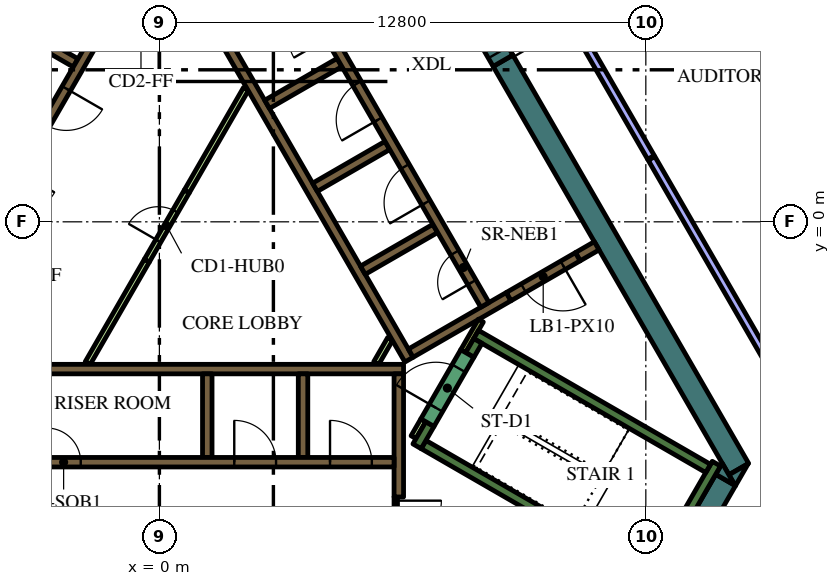
"""IFC4 building model, lengths in metres.
Left out: names, types, materials, properties, quantities, classifications, styles, units other than length and angle.
Written with IfcOpenShell. Run it as: python <this file> out.ifc"""

import sys

from ifc_helpers import new_model, si_unit, direction, frame, frame_2d, origin, place, context, subcontext, project, spatial, polyline, rectangle, outline, extrude, element, fill, save


model = new_model("IFC4")
c1 = context("Model", 3, precision=1e-05, world=origin(), true_north=direction((0.0, 1.0)))
c2 = subcontext(c1, "Body", "Model", "MODEL_VIEW")
j1 = project(units=[si_unit("LENGTHUNIT", "METRE"), si_unit("PLANEANGLEUNIT", "RADIAN")], contexts=[c1])
p1 = place(None, origin())
s1 = spatial("IfcSite", under=j1, at=p1, CompositionType="ELEMENT")
p2 = place(p1, origin())
s2 = spatial("IfcBuilding", under=s1, at=p2, CompositionType="ELEMENT")
p3 = place(p2, frame((0.0, 0.0, 317.4)))
s3 = spatial("IfcBuildingStorey", under=s2, at=p3, CompositionType="ELEMENT", Elevation=317.4)
p4 = place(p3, frame((9.042, 4.239, 0.0), z_axis=(0.0, 0.0, 1.0), x_axis=(0.500005785455, -0.866022063525, 0.0)))
e1 = element("IfcWall", 1, at=p4, inside=s3, PredefinedType="SOLIDWALL", context=c2, shape_type="SweptSolid", body=[
    extrude(rectangle(XDim=12.406, YDim=0.6, at=frame_2d((6.203, 0.0))), origin(), (0.0, 0.0, 1.0), 4.2),
])
p5 = place(p3, origin())
e2 = element("IfcWall", 2, at=p5, inside=s3, PredefinedType="SOLIDWALL", context=c2, shape_type="SweptSolid", body=[
    extrude(outline(polyline([(15.156, -6.95), (14.987, -6.657), (15.493, -6.365), (15.156, -6.95)])), origin(), (0.0, 0.0, 1.0), 4.2),
])
p6 = place(p3, frame((12.987, -10.106, 0.0), z_axis=(0.0, 0.0, 1.0), x_axis=(0.499950938802, 0.866053727428, 0.0)))
e3 = element("IfcWall", 3, at=p6, inside=s3, PredefinedType="SOLIDWALL", context=c2, shape_type="SweptSolid", body=[
    extrude(rectangle(XDim=3.823, YDim=0.6, at=frame_2d((1.912, 0.0))), origin(), (0.0, 0.0, 1.0), 4.2),
])
e4 = element("IfcWall", 4, at=p5, inside=s3, PredefinedType="SOLIDWALL", context=c2, shape_type="SweptSolid", body=[
    extrude(outline(polyline([(14.809, -6.35), (15.147, -6.936), (14.64, -6.643), (14.809, -6.35)])), origin(), (0.0, 0.0, 1.0), 4.2),
])
p7 = place(p3, frame((12.84, -9.511, 0.0), z_axis=(0.0, 0.0, 1.0), x_axis=(0.500048121057, 0.865997619297, 0.0)))
e5 = element("IfcWall", 5, at=p7, inside=s3, PredefinedType="SOLIDWALL", context=c2, shape_type="SweptSolid", body=[
    extrude(rectangle(XDim=3.634, YDim=0.25, at=frame_2d((1.817, 0.0))), origin(), (0.0, 0.0, 1.0), 4.2),
])
p8 = place(p3, frame((12.84, -9.261, 0.0), z_axis=(0.0, 0.0, 1.0), x_axis=(-0.866013990052, 0.500019768644, 0.0)))
e6 = element("IfcWall", 6, at=p8, inside=s3, PredefinedType="SOLIDWALL", context=c2, shape_type="SweptSolid", body=[
    extrude(rectangle(XDim=6.8, YDim=0.25, at=frame_2d((3.4, 0.0))), origin(), (0.0, 0.0, 1.0), 4.2),
])
p9 = place(p3, frame((6.78, -5.906, 0.0), z_axis=(0.0, 0.0, 1.0), x_axis=(0.500223362819, 0.865896406789, 0.0)))
e7 = element("IfcWall", 7, at=p9, inside=s3, PredefinedType="SOLIDWALL", context=c2, shape_type="SweptSolid", body=[
    extrude(rectangle(XDim=0.675, YDim=0.25, at=frame_2d((0.337, 0.0))), origin(), (0.0, 0.0, 1.0), 4.2),
])
p10 = place(p3, frame((8.334, -2.964, 0.0), z_axis=(0.0, 0.0, 1.0), x_axis=(0.866016039709, -0.500016218704, 0.0)))
e8 = element("IfcWall", 8, at=p10, inside=s3, PredefinedType="SOLIDWALL", context=c2, shape_type="SweptSolid", body=[
    extrude(rectangle(XDim=7.05, YDim=0.25, at=frame_2d((3.525, 0.0))), origin(), (0.0, 0.0, 1.0), 4.2),
])
p11 = place(p3, frame((8.168, -3.503, 0.0), z_axis=(0.0, 0.0, 1.0), x_axis=(0.49972245349, 0.866185586049, 0.0)))
e9 = element("IfcWall", 9, at=p11, inside=s3, PredefinedType="SOLIDWALL", context=c2, shape_type="SweptSolid", body=[
    extrude(rectangle(XDim=0.425, YDim=0.25, at=frame_2d((0.212, 0.0))), origin(), (0.0, 0.0, 1.0), 4.2),
])
p12 = place(p3, frame((-5.545, -3.875, 0.0), z_axis=(0.0, 0.0, 1.0), x_axis=(1.0, 0.0, 0.0)))
e10 = element("IfcWall", 10, at=p12, inside=s3, PredefinedType="SOLIDWALL", context=c2, shape_type="SweptSolid", body=[
    extrude(rectangle(XDim=11.97, YDim=0.25, at=frame_2d((5.985, 0.0))), origin(), (0.0, 0.0, 1.0), 4.2),
])
p13 = place(p3, frame((6.3, -7.24, 0.0), z_axis=(0.0, 0.0, 1.0), x_axis=(0.0, 1.0, 0.0)))
e11 = element("IfcWall", 11, at=p13, inside=s3, PredefinedType="SOLIDWALL", context=c2, shape_type="SweptSolid", body=[
    extrude(rectangle(XDim=3.24, YDim=0.25, at=frame_2d((1.62, 0.0))), origin(), (0.0, 0.0, 1.0), 4.2),
])
for number, where, z_axis, x_axis in (
    (12, (3.78, -4.0, 0.0), (0.0, 0.0, 1.0), (0.0, -1.0, 0.0)),
    (13, (1.26, -4.0, 0.0), (0.0, 0.0, 1.0), (0.0, -1.0, 0.0)),
):
    element("IfcWall", number, at=place(p3, frame(where, z_axis=z_axis, x_axis=x_axis)), inside=s3, PredefinedType="SOLIDWALL", context=c2, shape_type="SweptSolid", body=[
        extrude(rectangle(XDim=2.2, YDim=0.25, at=frame_2d((1.1, 0.0))), origin(), (0.0, 0.0, 1.0), 4.2),
    ])
p14 = place(p3, frame((11.507, -0.631, 0.0), z_axis=(0.0, 0.0, 1.0), x_axis=(-0.866093731455, -0.499881634324, 0.0)))
e14 = element("IfcWall", 14, at=p14, inside=s3, PredefinedType="SOLIDWALL", context=c2, shape_type="SweptSolid", body=[
    extrude(rectangle(XDim=0.575, YDim=0.25, at=frame_2d((0.288, 0.0))), origin(), (0.0, 0.0, 1.0), 4.2),
])
p15 = place(p3, frame((6.568, -3.627, 0.0), z_axis=(0.0, 0.0, 1.0), x_axis=(-0.499999455981, 0.866025717874, 0.0)))
e15 = element("IfcWall", 15, at=p15, inside=s3, PredefinedType="SOLIDWALL", context=c2, shape_type="SweptSolid", body=[
    extrude(rectangle(XDim=11.978, YDim=0.25, at=frame_2d((5.989, 0.0))), origin(), (0.0, 0.0, 1.0), 4.2),
])
for number, where, z_axis, x_axis in (
    (16, (2.834, 3.091, 0.0), (0.0, 0.0, 1.0), (0.866, 0.5, 0.0)),
    (17, (4.094, 0.909, 0.0), (0.0, 0.0, 1.0), (0.866, 0.5, 0.0)),
    (18, (5.354, -1.274, 0.0), (0.0, 0.0, 1.0), (0.866, 0.5, 0.0)),
):
    element("IfcWall", number, at=place(p3, frame(where, z_axis=z_axis, x_axis=x_axis)), inside=s3, PredefinedType="SOLIDWALL", context=c2, shape_type="SweptSolid", body=[
        extrude(rectangle(XDim=2.2, YDim=0.25, at=frame_2d((1.1, 0.0))), origin(), (0.0, 0.0, 1.0), 4.2),
    ])
p16 = place(p3, frame((6.614, -3.456, 0.0), z_axis=(0.0, 0.0, 1.0), x_axis=(0.866032512851, 0.499987686533, 0.0)))
e19 = element("IfcWall", 19, at=p16, inside=s3, PredefinedType="SOLIDWALL", context=c2, shape_type="SweptSolid", body=[
    extrude(rectangle(XDim=2.975, YDim=0.25, at=frame_2d((1.487, 0.0))), origin(), (0.0, 0.0, 1.0), 4.2),
])
p17 = place(p3, frame((-8.06, -1.311, 0.0), z_axis=(0.0, 0.0, 1.0), x_axis=(0.50000273126, 0.866023826885, 0.0)))
e20 = element("IfcWall", 20, at=p17, inside=s3, PredefinedType="SOLIDWALL", context=c2, shape_type="SweptSolid", body=[
    extrude(rectangle(XDim=10.33, YDim=0.25, at=frame_2d((5.165, 0.0))), origin(), (0.0, 0.0, 1.0), 4.2),
])
p18 = place(p3, frame((-2.204, 4.182, 0.0), z_axis=(0.0, 0.0, 1.0), x_axis=(-0.866008176907, 0.50002983664, 0.0)))
e21 = element("IfcWall", 21, at=p18, inside=s3, PredefinedType="SOLIDWALL", context=c2, shape_type="SweptSolid", body=[
    extrude(rectangle(XDim=2.2, YDim=0.25, at=frame_2d((1.1, 0.0))), origin(), (0.0, 0.0, 1.0), 4.2),
])
p19 = place(p3, frame((6.945, -5.222, 0.0), z_axis=(0.0, 0.0, 1.0), x_axis=(-0.499818422106, -0.866130212453, 0.0)))
e22 = element("IfcWall", 22, at=p19, inside=s3, PredefinedType="PARTITIONING", context=c2, shape_type="SweptSolid", body=[
    extrude(rectangle(XDim=0.514, YDim=0.15, at=frame_2d((0.257, 0.0))), origin(), (0.0, 0.0, 1.0), 3.5),
])
p20 = place(p3, frame((8.459, -2.599, 0.0), z_axis=(0.0, 0.0, 1.0), x_axis=(-0.500041054325, -0.866001699761, 0.0)))
e23 = element("IfcWall", 23, at=p20, inside=s3, PredefinedType="PARTITIONING", context=c2, shape_type="SweptSolid", body=[
    extrude(rectangle(XDim=0.929, YDim=0.15, at=frame_2d((0.464, 0.0))), origin(), (0.0, 0.0, 1.0), 4.2),
])
p21 = place(p3, frame((5.705, -3.718, 0.0), z_axis=(0.0, 0.0, 1.0), x_axis=(0.499962090823, 0.866047289552, 0.0)))
e24 = element("IfcWall", 24, at=p21, inside=s3, PredefinedType="PARTITIONING", context=c2, shape_type="SweptSolid", body=[
    extrude(rectangle(XDim=0.735, YDim=0.15, at=frame_2d((0.367, 0.0))), origin(), (0.0, 0.0, 1.0), 3.5),
])
p22 = place(p3, frame((-1.887, -3.718, 0.0), z_axis=(0.0, 0.0, 1.0), x_axis=(0.500043732237, 0.866000153493, 0.0)))
e25 = element("IfcWall", 25, at=p22, inside=s3, PredefinedType="PARTITIONING", context=c2, shape_type="SweptSolid", body=[
    extrude(rectangle(XDim=3.114, YDim=0.15, at=frame_2d((1.557, 0.0))), origin(), (0.0, 0.0, 1.0), 3.5),
])
p23 = place(p3, frame((0.72, 0.797, 0.0), z_axis=(0.0, 0.0, 1.0), x_axis=(0.499984921984, 0.866034108906, 0.0)))
e26 = element("IfcWall", 26, at=p23, inside=s3, PredefinedType="PARTITIONING", context=c2, shape_type="SweptSolid", body=[
    extrude(rectangle(XDim=3.113, YDim=0.15, at=frame_2d((1.557, 0.0))), origin(), (0.0, 0.0, 1.0), 3.5),
])
p24 = place(p3, frame((-6.175, -6.325, 0.0), z_axis=(0.0, 0.0, 1.0), x_axis=(1.0, 0.0, 0.0)))
e27 = element("IfcWall", 27, at=p24, inside=s3, PredefinedType="SOLIDWALL", context=c2, shape_type="SweptSolid", body=[
    extrude(rectangle(XDim=12.35, YDim=0.25, at=frame_2d((6.175, 0.0))), origin(), (0.0, 0.0, 1.0), 4.2),
])
p25 = place(p24, frame((3.205, 0.0, 0.0)))
e28 = element("IfcOpeningElement", 28, at=p25, cuts=e27, PredefinedType="OPENING", context=c2, shape_type="SweptSolid", body=[
    extrude(rectangle(XDim=0.9, YDim=2.1, at=frame_2d((0.45, 1.05))), frame((0.0, 0.135, 0.0), z_axis=(0.0, -1.0, 0.0), x_axis=(1.0, 0.0, 0.0)), (0.0, 0.0, 1.0), 0.27),
])
p26 = place(p24, frame((8.145, 0.0, 0.0)))
e29 = element("IfcOpeningElement", 29, at=p26, cuts=e27, PredefinedType="OPENING", context=c2, shape_type="SweptSolid", body=[
    extrude(rectangle(XDim=1.1, YDim=2.1, at=frame_2d((0.55, 1.05))), frame((0.0, 0.135, 0.0), z_axis=(0.0, -1.0, 0.0), x_axis=(1.0, 0.0, 0.0)), (0.0, 0.0, 1.0), 0.27),
])
p27 = place(p24, frame((10.665, 0.0, 0.0)))
e30 = element("IfcOpeningElement", 30, at=p27, cuts=e27, PredefinedType="OPENING", context=c2, shape_type="SweptSolid", body=[
    extrude(rectangle(XDim=1.1, YDim=2.1, at=frame_2d((0.55, 1.05))), frame((0.0, 0.135, 0.0), z_axis=(0.0, -1.0, 0.0), x_axis=(1.0, 0.0, 0.0)), (0.0, 0.0, 1.0), 0.27),
])
p28 = place(p3, frame((8.565, -2.185, 0.0), z_axis=(0.0, 0.0, 1.0), x_axis=(-0.499997954832, 0.866026584559, 0.0)))
e31 = element("IfcWall", 31, at=p28, inside=s3, PredefinedType="SOLIDWALL", context=c2, shape_type="SweptSolid", body=[
    extrude(rectangle(XDim=12.35, YDim=0.25, at=frame_2d((6.175, 0.0))), origin(), (0.0, 0.0, 1.0), 4.2),
])
p29 = place(p28, frame((0.685, 0.0, 0.0)))
e32 = element("IfcOpeningElement", 32, at=p29, cuts=e31, PredefinedType="OPENING", context=c2, shape_type="SweptSolid", body=[
    extrude(rectangle(XDim=0.9, YDim=2.1, at=frame_2d((0.45, 1.05))), frame((0.0, 0.135, 0.0), z_axis=(0.0, -1.0, 0.0), x_axis=(1.0, 0.0, 0.0)), (0.0, 0.0, 1.0), 0.27),
])
p30 = place(p28, frame((3.105, 0.0, 0.0)))
e33 = element("IfcOpeningElement", 33, at=p30, cuts=e31, PredefinedType="OPENING", context=c2, shape_type="SweptSolid", body=[
    extrude(rectangle(XDim=1.1, YDim=2.1, at=frame_2d((0.55, 1.05))), frame((0.0, 0.135, 0.0), z_axis=(0.0, -1.0, 0.0), x_axis=(1.0, 0.0, 0.0)), (0.0, 0.0, 1.0), 0.27),
])
p31 = place(p28, frame((5.625, 0.0, 0.0)))
e34 = element("IfcOpeningElement", 34, at=p31, cuts=e31, PredefinedType="OPENING", context=c2, shape_type="SweptSolid", body=[
    extrude(rectangle(XDim=1.1, YDim=2.1, at=frame_2d((0.55, 1.05))), frame((0.0, 0.135, 0.0), z_axis=(0.0, -1.0, 0.0), x_axis=(1.0, 0.0, 0.0)), (0.0, 0.0, 1.0), 0.27),
])
p32 = place(p28, frame((8.145, 0.0, 0.0)))
e35 = element("IfcOpeningElement", 35, at=p32, cuts=e31, PredefinedType="OPENING", context=c2, shape_type="SweptSolid", body=[
    extrude(rectangle(XDim=1.1, YDim=2.1, at=frame_2d((0.55, 1.05))), frame((0.0, 0.135, 0.0), z_axis=(0.0, -1.0, 0.0), x_axis=(1.0, 0.0, 0.0)), (0.0, 0.0, 1.0), 0.27),
])
p33 = place(p28, frame((10.665, 0.0, 0.0)))
e36 = element("IfcOpeningElement", 36, at=p33, cuts=e31, PredefinedType="OPENING", context=c2, shape_type="SweptSolid", body=[
    extrude(rectangle(XDim=1.1, YDim=2.1, at=frame_2d((0.55, 1.05))), frame((0.0, 0.135, 0.0), z_axis=(0.0, -1.0, 0.0), x_axis=(1.0, 0.0, 0.0)), (0.0, 0.0, 1.0), 0.27),
])
p34 = place(p3, frame((-0.898, 6.194, 0.0), z_axis=(0.0, 0.0, 1.0), x_axis=(-0.499996202215, -0.866027596426, 0.0)))
e37 = element("IfcWall", 37, at=p34, inside=s3, PredefinedType="SOLIDWALL", context=c2, shape_type="SweptSolid", body=[
    extrude(rectangle(XDim=9.83, YDim=0.25, at=frame_2d((4.915, 0.0))), origin(), (0.0, 0.0, 1.0), 4.2),
])
p35 = place(p34, frame((0.585, 0.0, 0.0)))
e38 = element("IfcOpeningElement", 38, at=p35, cuts=e37, PredefinedType="OPENING", context=c2, shape_type="SweptSolid", body=[
    extrude(rectangle(XDim=1.1, YDim=2.1, at=frame_2d((0.55, 1.05))), frame((0.0, 0.135, 0.0), z_axis=(0.0, -1.0, 0.0), x_axis=(1.0, 0.0, 0.0)), (0.0, 0.0, 1.0), 0.27),
])
p36 = place(p34, frame((3.105, 0.0, 0.0)))
e39 = element("IfcOpeningElement", 39, at=p36, cuts=e37, PredefinedType="OPENING", context=c2, shape_type="SweptSolid", body=[
    extrude(rectangle(XDim=1.1, YDim=2.1, at=frame_2d((0.55, 1.05))), frame((0.0, 0.135, 0.0), z_axis=(0.0, -1.0, 0.0), x_axis=(1.0, 0.0, 0.0)), (0.0, 0.0, 1.0), 0.27),
])
p37 = place(p34, frame((5.625, 0.0, 0.0)))
e40 = element("IfcOpeningElement", 40, at=p37, cuts=e37, PredefinedType="OPENING", context=c2, shape_type="SweptSolid", body=[
    extrude(rectangle(XDim=1.1, YDim=2.1, at=frame_2d((0.55, 1.05))), frame((0.0, 0.135, 0.0), z_axis=(0.0, -1.0, 0.0), x_axis=(1.0, 0.0, 0.0)), (0.0, 0.0, 1.0), 0.27),
])
p38 = place(p34, frame((8.145, 0.0, 0.0)))
e41 = element("IfcOpeningElement", 41, at=p38, cuts=e37, PredefinedType="OPENING", context=c2, shape_type="SweptSolid", body=[
    extrude(rectangle(XDim=1.1, YDim=2.1, at=frame_2d((0.55, 1.05))), frame((0.0, 0.135, 0.0), z_axis=(0.0, -1.0, 0.0), x_axis=(1.0, 0.0, 0.0)), (0.0, 0.0, 1.0), 0.27),
])
p39 = place(p3, frame((7.053, -5.284, 0.0), z_axis=(0.0, 0.0, 1.0), x_axis=(0.500078061341, 0.865980330357, 0.0)))
e42 = element("IfcWall", 42, at=p39, inside=s3, PredefinedType="SOLIDWALL", context=c2, shape_type="SweptSolid", body=[
    extrude(rectangle(XDim=2.1, YDim=0.4, at=frame_2d((1.05, 0.0))), origin(), (0.0, 0.0, 1.0), 4.2),
])
p40 = place(p39, frame((0.45, 0.0, 0.0)))
e43 = element("IfcOpeningElement", 43, at=p40, cuts=e42, PredefinedType="OPENING", context=c2, shape_type="SweptSolid", body=[
    extrude(rectangle(XDim=1.2, YDim=2.1, at=frame_2d((0.6, 1.05))), frame((0.0, 0.21, 0.0), z_axis=(0.0, -1.0, 0.0), x_axis=(1.0, 0.0, 0.0)), (0.0, 0.0, 1.0), 0.42),
])
p41 = place(p3, frame((-0.33, -1.022, 0.0), z_axis=(0.0, 0.0, 1.0), x_axis=(0.500027713859, 0.866009402589, 0.0)))
e44 = element("IfcWall", 44, at=p41, inside=s3, PredefinedType="PARTITIONING", context=c2, shape_type="SweptSolid", body=[
    extrude(rectangle(XDim=2.1, YDim=0.15, at=frame_2d((1.05, 0.0))), origin(), (0.0, 0.0, 1.0), 3.5),
])
p42 = place(p41, frame((0.6, 0.0, 0.0)))
e45 = element("IfcOpeningElement", 45, at=p42, cuts=e44, PredefinedType="OPENING", context=c2, shape_type="SweptSolid", body=[
    extrude(rectangle(XDim=0.9, YDim=2.1, at=frame_2d((0.45, 1.05))), frame((0.0, 0.085, 0.0), z_axis=(0.0, -1.0, 0.0), x_axis=(1.0, 0.0, 0.0)), (0.0, 0.0, 1.0), 0.17),
])
p43 = place(p3, frame((6.22, -7.237, 0.0), z_axis=(0.0, 0.0, 1.0), x_axis=(0.0, -1.0, 0.0)))
e46 = element("IfcWall", 46, at=p43, inside=s3, PredefinedType="PARTITIONING", context=c2, shape_type="SweptSolid", body=[
    extrude(rectangle(XDim=1.4, YDim=0.09, at=frame_2d((0.7, 0.0))), origin(), (0.0, 0.0, 1.0), 3.5),
])
p44 = place(p43, frame((0.1, 0.0, 0.0)))
e47 = element("IfcOpeningElement", 47, at=p44, cuts=e46, PredefinedType="OPENING", context=c2, shape_type="SweptSolid", body=[
    extrude(rectangle(XDim=1.2, YDim=2.1, at=frame_2d((0.6, 1.05))), frame((0.0, 0.055, 0.0), z_axis=(0.0, -1.0, 0.0), x_axis=(1.0, 0.0, 0.0)), (0.0, 0.0, 1.0), 0.11),
])
p45 = place(p3, frame((11.009, -0.919, 0.0), z_axis=(0.0, 0.0, 1.0), x_axis=(-0.866059744384, -0.49994051562, 0.0)))
e48 = element("IfcWall", 48, at=p45, inside=s3, PredefinedType="SOLIDWALL", context=c2, shape_type="SweptSolid", body=[
    extrude(rectangle(XDim=2.1, YDim=0.25, at=frame_2d((1.05, 0.0))), origin(), (0.0, 0.0, 1.0), 4.2),
])
p46 = place(p45, frame((0.45, 0.0, 0.0)))
e49 = element("IfcOpeningElement", 49, at=p46, cuts=e48, PredefinedType="OPENING", context=c2, shape_type="SweptSolid", body=[
    extrude(rectangle(XDim=1.2, YDim=2.1, at=frame_2d((0.6, 1.05))), frame((0.0, 0.135, 0.0), z_axis=(0.0, -1.0, 0.0), x_axis=(1.0, 0.0, 0.0)), (0.0, 0.0, 1.0), 0.27),
])
p47 = place(p3, frame((8.192, 5.711, 0.0), z_axis=(0.0, 0.0, 1.0), x_axis=(0.500062241894, -0.865989465428, 0.0)))
e50 = element("IfcWall", 50, at=p47, inside=s3, PredefinedType="SOLIDWALL", context=c2, shape_type="SweptSolid", body=[
    extrude(rectangle(XDim=1.7, YDim=0.6, at=frame_2d((0.85, 0.0))), origin(), (0.0, 0.0, 1.0), 4.2),
])
p48 = place(p47, frame((0.25, 0.0, 0.0)))
e51 = element("IfcOpeningElement", 51, at=p48, cuts=e50, PredefinedType="OPENING", context=c2, shape_type="SweptSolid", body=[
    extrude(rectangle(XDim=1.2, YDim=2.1, at=frame_2d((0.6, 1.05))), frame((0.0, 0.31, 0.0), z_axis=(0.0, -1.0, 0.0), x_axis=(1.0, 0.0, 0.0)), (0.0, 0.0, 1.0), 0.62),
])
p49 = place(p3, frame((12.936, 1.695, 0.0), z_axis=(0.0, 0.0, 1.0), x_axis=(-0.500004234368, 0.866022959057, 0.0)))
e52 = element("IfcWall", 52, at=p49, inside=s3, PredefinedType="PARTITIONING", context=c2, shape_type="SweptSolid", body=[
    extrude(rectangle(XDim=10.0, YDim=0.2, at=frame_2d((5.0, 0.0))), origin(), (0.0, 0.0, 1.0), 3.5),
])
p50 = place(p49, frame((4.1, 0.0, 0.0)))
e53 = element("IfcOpeningElement", 53, at=p50, cuts=e52, PredefinedType="OPENING", context=c2, shape_type="SweptSolid", body=[
    extrude(rectangle(XDim=1.8, YDim=2.1, at=frame_2d((0.9, 1.05))), frame((0.0, 0.11, 0.0), z_axis=(0.0, -1.0, 0.0), x_axis=(1.0, 0.0, 0.0)), (0.0, 0.0, 1.0), 0.22),
])
p51 = place(p3, frame((17.565, -6.324, 0.0), z_axis=(0.0, 0.0, 1.0), x_axis=(-0.49998273032, 0.866035374209, 0.0)))
e54 = element("IfcWall", 54, at=p51, inside=s3, PredefinedType="PARTITIONING", context=c2, shape_type="SweptSolid", body=[
    extrude(rectangle(XDim=9.229, YDim=0.2, at=frame_2d((4.615, 0.0))), origin(), (0.0, 0.0, 1.0), 3.5),
])
p52 = place(p25, origin())
e55 = element("IfcDoor", 55, at=p52, inside=s3, OperationType="SINGLE_SWING_LEFT", PredefinedType="DOOR", context=c2, shape_type="SweptSolid", body=[
    extrude(rectangle(XDim=0.9, YDim=2.1, at=frame_2d((0.45, 1.05))), frame((0.0, 0.025, 0.0), z_axis=(0.0, -1.0, 0.0), x_axis=(1.0, 0.0, 0.0)), (0.0, 0.0, 1.0), 0.05),
])
fill(e28, e55)
p53 = place(p26, origin())
e56 = element("IfcDoor", 56, at=p53, inside=s3, OperationType="DOUBLE_DOOR_SLIDING", PredefinedType="DOOR", context=c2, shape_type="SweptSolid", body=[
    extrude(rectangle(XDim=1.1, YDim=2.1, at=frame_2d((0.55, 1.05))), frame((0.0, 0.025, 0.0), z_axis=(0.0, -1.0, 0.0), x_axis=(1.0, 0.0, 0.0)), (0.0, 0.0, 1.0), 0.05),
])
fill(e29, e56)
p54 = place(p27, origin())
e57 = element("IfcDoor", 57, at=p54, inside=s3, OperationType="DOUBLE_DOOR_SLIDING", PredefinedType="DOOR", context=c2, shape_type="SweptSolid", body=[
    extrude(rectangle(XDim=1.1, YDim=2.1, at=frame_2d((0.55, 1.05))), frame((0.0, 0.025, 0.0), z_axis=(0.0, -1.0, 0.0), x_axis=(1.0, 0.0, 0.0)), (0.0, 0.0, 1.0), 0.05),
])
fill(e30, e57)
p55 = place(p29, origin())
e58 = element("IfcDoor", 58, at=p55, inside=s3, OperationType="SINGLE_SWING_LEFT", PredefinedType="DOOR", context=c2, shape_type="SweptSolid", body=[
    extrude(rectangle(XDim=0.9, YDim=2.1, at=frame_2d((0.45, 1.05))), frame((0.0, 0.025, 0.0), z_axis=(0.0, -1.0, 0.0), x_axis=(1.0, 0.0, 0.0)), (0.0, 0.0, 1.0), 0.05),
])
fill(e32, e58)
p56 = place(p30, origin())
e59 = element("IfcDoor", 59, at=p56, inside=s3, OperationType="DOUBLE_DOOR_SLIDING", PredefinedType="DOOR", context=c2, shape_type="SweptSolid", body=[
    extrude(rectangle(XDim=1.1, YDim=2.1, at=frame_2d((0.55, 1.05))), frame((0.0, 0.025, 0.0), z_axis=(0.0, -1.0, 0.0), x_axis=(1.0, 0.0, 0.0)), (0.0, 0.0, 1.0), 0.05),
])
fill(e33, e59)
p57 = place(p31, origin())
e60 = element("IfcDoor", 60, at=p57, inside=s3, OperationType="DOUBLE_DOOR_SLIDING", PredefinedType="DOOR", context=c2, shape_type="SweptSolid", body=[
    extrude(rectangle(XDim=1.1, YDim=2.1, at=frame_2d((0.55, 1.05))), frame((0.0, 0.025, 0.0), z_axis=(0.0, -1.0, 0.0), x_axis=(1.0, 0.0, 0.0)), (0.0, 0.0, 1.0), 0.05),
])
fill(e34, e60)
p58 = place(p36, origin())
e61 = element("IfcDoor", 61, at=p58, inside=s3, OperationType="DOUBLE_DOOR_SLIDING", PredefinedType="DOOR", context=c2, shape_type="SweptSolid", body=[
    extrude(rectangle(XDim=1.1, YDim=2.1, at=frame_2d((0.55, 1.05))), frame((0.0, 0.025, 0.0), z_axis=(0.0, -1.0, 0.0), x_axis=(1.0, 0.0, 0.0)), (0.0, 0.0, 1.0), 0.05),
])
fill(e39, e61)
p59 = place(p40, origin())
e62 = element("IfcDoor", 62, at=p59, inside=s3, OperationType="SINGLE_SWING_LEFT", PredefinedType="DOOR", context=c2, shape_type="SweptSolid", body=[
    extrude(rectangle(XDim=1.2, YDim=2.1, at=frame_2d((0.6, 1.05))), frame((0.0, 0.025, 0.0), z_axis=(0.0, -1.0, 0.0), x_axis=(1.0, 0.0, 0.0)), (0.0, 0.0, 1.0), 0.05),
])
fill(e43, e62)
p60 = place(p42, origin())
e63 = element("IfcDoor", 63, at=p60, inside=s3, OperationType="SINGLE_SWING_LEFT", PredefinedType="DOOR", context=c2, shape_type="SweptSolid", body=[
    extrude(rectangle(XDim=0.9, YDim=2.1, at=frame_2d((0.45, 1.05))), frame((0.0, 0.025, 0.0), z_axis=(0.0, -1.0, 0.0), x_axis=(1.0, 0.0, 0.0)), (0.0, 0.0, 1.0), 0.05),
])
fill(e45, e63)
p61 = place(p44, origin())
e64 = element("IfcDoor", 64, at=p61, inside=s3, OperationType="SINGLE_SWING_LEFT", PredefinedType="DOOR", context=c2, shape_type="SweptSolid", body=[
    extrude(rectangle(XDim=1.2, YDim=2.1, at=frame_2d((0.6, 1.05))), frame((0.0, 0.025, 0.0), z_axis=(0.0, -1.0, 0.0), x_axis=(1.0, 0.0, 0.0)), (0.0, 0.0, 1.0), 0.05),
])
fill(e47, e64)
p62 = place(p46, origin())
e65 = element("IfcDoor", 65, at=p62, inside=s3, OperationType="SINGLE_SWING_LEFT", PredefinedType="DOOR", context=c2, shape_type="SweptSolid", body=[
    extrude(rectangle(XDim=1.2, YDim=2.1, at=frame_2d((0.6, 1.05))), frame((0.0, 0.025, 0.0), z_axis=(0.0, -1.0, 0.0), x_axis=(1.0, 0.0, 0.0)), (0.0, 0.0, 1.0), 0.05),
])
fill(e49, e65)
p63 = place(p48, origin())
e66 = element("IfcDoor", 66, at=p63, inside=s3, OperationType="SINGLE_SWING_LEFT", PredefinedType="DOOR", context=c2, shape_type="SweptSolid", body=[
    extrude(rectangle(XDim=1.2, YDim=2.1, at=frame_2d((0.6, 1.05))), frame((0.0, 0.025, 0.0), z_axis=(0.0, -1.0, 0.0), x_axis=(1.0, 0.0, 0.0)), (0.0, 0.0, 1.0), 0.05),
])
fill(e51, e66)
save(model, sys.argv[1])
